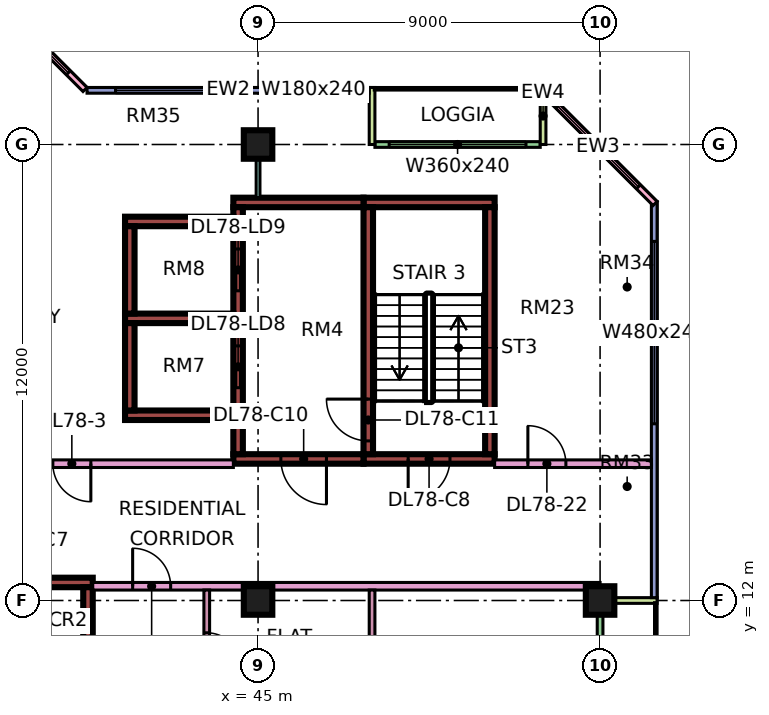
"""IFC4 building model, lengths in metres.
Left out: names, types, materials, properties, quantities, classifications, styles, units other than length and angle.
Written with IfcOpenShell. Run it as: python <this file> out.ifc"""

import sys

from ifc_helpers import new_model, si_unit, direction, frame, frame_2d, origin, origin_2d, place, context, subcontext, project, spatial, rectangle, extrude, element, fill, save


model = new_model("IFC4")
c1 = context("Model", 3, precision=1e-05, world=origin(), true_north=direction((0.0, 1.0)))
c2 = subcontext(c1, "Body", "Model", "MODEL_VIEW")
j1 = project(units=[si_unit("LENGTHUNIT", "METRE"), si_unit("PLANEANGLEUNIT", "RADIAN")], contexts=[c1])
p1 = place(None, origin())
s1 = spatial("IfcSite", under=j1, at=p1, CompositionType="ELEMENT")
p2 = place(p1, origin())
s2 = spatial("IfcBuilding", under=s1, at=p2, CompositionType="ELEMENT")
p3 = place(p2, frame((0.0, 0.0, 338.9)))
s3 = spatial("IfcBuildingStorey", under=s2, at=p3, CompositionType="ELEMENT", Elevation=338.9)
for number, where, z_axis, x_axis in (
    (1, (45.0, 12.0, 0.0), (0.0, 0.0, 1.0), (1.0, 0.0, 0.0)),
    (2, (45.0, 24.0, 0.0), (0.0, 0.0, 1.0), (1.0, 0.0, 0.0)),
    (3, (54.0, 12.0, 0.0), (0.0, 0.0, 1.0), (1.0, 0.0, 0.0)),
):
    element("IfcColumn", number, at=place(p3, frame(where, z_axis=z_axis, x_axis=x_axis)), inside=s3, PredefinedType="COLUMN", context=c2, shape_type="SweptSolid", body=[
        extrude(rectangle(XDim=0.75, YDim=0.75, at=origin_2d()), origin(), (0.0, 0.0, 1.0), 3.75),
    ])
p4 = place(p3, frame((36.375, 12.475, 0.0), z_axis=(0.0, 0.0, 1.0), x_axis=(1.0, 0.0, 0.0)))
e4 = element("IfcWall", 4, at=p4, inside=s3, PredefinedType="SHEAR", context=c2, shape_type="SweptSolid", body=[
    extrude(rectangle(XDim=4.275, YDim=0.25, at=frame_2d((2.137, 0.0))), origin(), (0.0, 0.0, 1.0), 3.75),
])
p5 = place(p4, frame((2.0, 0.0, 0.0)))
e5 = element("IfcOpeningElement", 5, at=p5, cuts=e4, PredefinedType="OPENING", context=c2, shape_type="SweptSolid", body=[
    extrude(rectangle(XDim=1.1, YDim=2.2, at=frame_2d((0.55, 1.1))), frame((0.0, 0.135, 0.0), z_axis=(0.0, -1.0, 0.0), x_axis=(1.0, 0.0, 0.0)), (0.0, 0.0, 1.0), 0.27),
])
p6 = place(p3, frame((40.525, 5.85, 0.0), z_axis=(0.0, 0.0, 1.0), x_axis=(0.0, 1.0, 0.0)))
e6 = element("IfcWall", 6, at=p6, inside=s3, PredefinedType="SHEAR", context=c2, shape_type="SweptSolid", body=[
    extrude(rectangle(XDim=6.5, YDim=0.25, at=frame_2d((3.25, 0.0))), origin(), (0.0, 0.0, 1.0), 3.75),
])
p7 = place(p3, frame((47.775, 15.725, 0.0), z_axis=(0.0, 0.0, 1.0), x_axis=(1.0, 0.0, 0.0)))
e7 = element("IfcWall", 7, at=p7, inside=s3, PredefinedType="SHEAR", context=c2, shape_type="SweptSolid", body=[
    extrude(rectangle(XDim=3.45, YDim=0.25, at=frame_2d((1.725, 0.0))), origin(), (0.0, 0.0, 1.0), 3.75),
])
p8 = place(p7, frame((1.175, 0.0, 0.0)))
e8 = element("IfcOpeningElement", 8, at=p8, cuts=e7, PredefinedType="OPENING", context=c2, shape_type="SweptSolid", body=[
    extrude(rectangle(XDim=1.1, YDim=2.2, at=frame_2d((0.55, 1.1))), frame((0.0, 0.135, 0.0), z_axis=(0.0, -1.0, 0.0), x_axis=(1.0, 0.0, 0.0)), (0.0, 0.0, 1.0), 0.27),
])
p9 = place(p3, frame((47.775, 22.475, 0.0), z_axis=(0.0, 0.0, 1.0), x_axis=(1.0, 0.0, 0.0)))
e9 = element("IfcWall", 9, at=p9, inside=s3, PredefinedType="SHEAR", context=c2, shape_type="SweptSolid", body=[
    extrude(rectangle(XDim=3.45, YDim=0.25, at=frame_2d((1.725, 0.0))), origin(), (0.0, 0.0, 1.0), 3.75),
])
p10 = place(p3, frame((47.9, 15.85, 0.0), z_axis=(0.0, 0.0, 1.0), x_axis=(0.0, 1.0, 0.0)))
e10 = element("IfcWall", 10, at=p10, inside=s3, PredefinedType="SHEAR", context=c2, shape_type="SweptSolid", body=[
    extrude(rectangle(XDim=6.5, YDim=0.25, at=frame_2d((3.25, 0.0))), origin(), (0.0, 0.0, 1.0), 3.75),
])
p11 = place(p10, frame((0.35, 0.0, 0.0)))
e11 = element("IfcOpeningElement", 11, at=p11, cuts=e10, PredefinedType="OPENING", context=c2, shape_type="SweptSolid", body=[
    extrude(rectangle(XDim=1.1, YDim=2.2, at=frame_2d((0.55, 1.1))), frame((0.0, 0.135, 0.0), z_axis=(0.0, -1.0, 0.0), x_axis=(1.0, 0.0, 0.0)), (0.0, 0.0, 1.0), 0.27),
])
p12 = place(p3, frame((51.1, 15.85, 0.0), z_axis=(0.0, 0.0, 1.0), x_axis=(0.0, 1.0, 0.0)))
e12 = element("IfcWall", 12, at=p12, inside=s3, PredefinedType="SHEAR", context=c2, shape_type="SweptSolid", body=[
    extrude(rectangle(XDim=6.5, YDim=0.25, at=frame_2d((3.25, 0.0))), origin(), (0.0, 0.0, 1.0), 3.75),
])
p13 = place(p3, frame((44.35, 15.725, 0.0), z_axis=(0.0, 0.0, 1.0), x_axis=(1.0, 0.0, 0.0)))
e13 = element("IfcWall", 13, at=p13, inside=s3, PredefinedType="SHEAR", context=c2, shape_type="SweptSolid", body=[
    extrude(rectangle(XDim=3.425, YDim=0.25, at=frame_2d((1.712, 0.0))), origin(), (0.0, 0.0, 1.0), 3.75),
])
p14 = place(p13, frame((1.25, 0.0, 0.0)))
e14 = element("IfcOpeningElement", 14, at=p14, cuts=e13, PredefinedType="OPENING", context=c2, shape_type="SweptSolid", body=[
    extrude(rectangle(XDim=1.2, YDim=2.2, at=frame_2d((0.6, 1.1))), frame((0.0, 0.135, 0.0), z_axis=(0.0, -1.0, 0.0), x_axis=(1.0, 0.0, 0.0)), (0.0, 0.0, 1.0), 0.27),
])
p15 = place(p3, frame((44.35, 22.475, 0.0), z_axis=(0.0, 0.0, 1.0), x_axis=(1.0, 0.0, 0.0)))
e15 = element("IfcWall", 15, at=p15, inside=s3, PredefinedType="SHEAR", context=c2, shape_type="SweptSolid", body=[
    extrude(rectangle(XDim=3.425, YDim=0.25, at=frame_2d((1.712, 0.0))), origin(), (0.0, 0.0, 1.0), 3.75),
])
p16 = place(p3, frame((44.475, 15.85, 0.0), z_axis=(0.0, 0.0, 1.0), x_axis=(0.0, 1.0, 0.0)))
e16 = element("IfcWall", 16, at=p16, inside=s3, PredefinedType="SHEAR", context=c2, shape_type="SweptSolid", body=[
    extrude(rectangle(XDim=6.5, YDim=0.25, at=frame_2d((3.25, 0.0))), origin(), (0.0, 0.0, 1.0), 3.75),
])
p17 = place(p16, frame((1.75, 0.0, 0.0)))
e17 = element("IfcOpeningElement", 17, at=p17, cuts=e16, PredefinedType="OPENING", context=c2, shape_type="SweptSolid", body=[
    extrude(rectangle(XDim=1.1, YDim=2.2, at=frame_2d((0.55, 1.1))), frame((0.0, 0.135, 0.0), z_axis=(0.0, -1.0, 0.0), x_axis=(1.0, 0.0, 0.0)), (0.0, 0.0, 1.0), 0.27),
])
p18 = place(p16, frame((4.3, 0.0, 0.0)))
e18 = element("IfcOpeningElement", 18, at=p18, cuts=e16, PredefinedType="OPENING", context=c2, shape_type="SweptSolid", body=[
    extrude(rectangle(XDim=1.1, YDim=2.2, at=frame_2d((0.55, 1.1))), frame((0.0, 0.135, 0.0), z_axis=(0.0, -1.0, 0.0), x_axis=(1.0, 0.0, 0.0)), (0.0, 0.0, 1.0), 0.27),
])
for number, where, z_axis, x_axis in (
    (19, (41.5, 16.875, 0.0), (0.0, 0.0, 1.0), (1.0, 0.0, 0.0)),
    (20, (41.5, 19.425, 0.0), (0.0, 0.0, 1.0), (1.0, 0.0, 0.0)),
    (21, (41.5, 21.975, 0.0), (0.0, 0.0, 1.0), (1.0, 0.0, 0.0)),
):
    element("IfcWall", number, at=place(p3, frame(where, z_axis=z_axis, x_axis=x_axis)), inside=s3, PredefinedType="SHEAR", context=c2, shape_type="SweptSolid", body=[
        extrude(rectangle(XDim=2.85, YDim=0.25, at=frame_2d((1.425, 0.0))), origin(), (0.0, 0.0, 1.0), 3.75),
    ])
for number, where, z_axis, x_axis in (
    (22, (41.625, 17.0, 0.0), (0.0, 0.0, 1.0), (0.0, 1.0, 0.0)),
    (23, (41.625, 19.55, 0.0), (0.0, 0.0, 1.0), (0.0, 1.0, 0.0)),
):
    element("IfcWall", number, at=place(p3, frame(where, z_axis=z_axis, x_axis=x_axis)), inside=s3, PredefinedType="SHEAR", context=c2, shape_type="SweptSolid", body=[
        extrude(rectangle(XDim=2.3, YDim=0.25, at=frame_2d((1.15, 0.0))), origin(), (0.0, 0.0, 1.0), 3.75),
    ])
p19 = place(p3, frame((52.425, 24.0, 0.0), z_axis=(0.0, 0.0, 1.0), x_axis=(-1.0, 0.0, 0.0)))
e24 = element("IfcWall", 24, at=p19, inside=s3, PredefinedType="SOLIDWALL", context=c2, shape_type="SweptSolid", body=[
    extrude(rectangle(XDim=4.35, YDim=0.15, at=frame_2d((2.175, 0.0))), origin(), (0.0, 0.0, 1.0), 3.35),
])
p20 = place(p19, frame((0.375, 0.0, 0.45)))
e25 = element("IfcOpeningElement", 25, at=p20, cuts=e24, PredefinedType="OPENING", context=c2, shape_type="SweptSolid", body=[
    extrude(rectangle(XDim=3.6, YDim=2.4, at=frame_2d((1.8, 1.2))), frame((0.0, 0.085, 0.0), z_axis=(0.0, -1.0, 0.0), x_axis=(1.0, 0.0, 0.0)), (0.0, 0.0, 1.0), 0.17),
])
for number, where, z_axis, x_axis in (
    (26, (52.5, 25.5, 0.0), (0.0, 0.0, 1.0), (0.0, -1.0, 0.0)),
    (27, (48.0, 25.5, 0.0), (0.0, 0.0, 1.0), (0.0, -1.0, 0.0)),
):
    element("IfcWall", number, at=place(p3, frame(where, z_axis=z_axis, x_axis=x_axis)), inside=s3, PredefinedType="SOLIDWALL", context=c2, shape_type="SweptSolid", body=[
        extrude(rectangle(XDim=1.5, YDim=0.15, at=frame_2d((0.75, 0.0))), origin(), (0.0, 0.0, 1.0), 3.35),
    ])
p21 = place(p3, frame((47.925, 25.425, 0.0), z_axis=(0.0, 0.0, 1.0), x_axis=(-1.0, 0.0, 0.0)))
e28 = element("IfcWall", 28, at=p21, inside=s3, PredefinedType="SOLIDWALL", context=c2, shape_type="SweptSolid", body=[
    extrude(rectangle(XDim=7.425, YDim=0.15, at=frame_2d((3.712, 0.0))), origin(), (0.0, 0.0, 1.0), 3.35),
])
p22 = place(p21, frame((0.562, 0.0, 0.45)))
e29 = element("IfcOpeningElement", 29, at=p22, cuts=e28, PredefinedType="OPENING", context=c2, shape_type="SweptSolid", body=[
    extrude(rectangle(XDim=1.8, YDim=2.4, at=frame_2d((0.9, 1.2))), frame((0.0, 0.085, 0.0), z_axis=(0.0, -1.0, 0.0), x_axis=(1.0, 0.0, 0.0)), (0.0, 0.0, 1.0), 0.17),
])
p23 = place(p21, frame((3.675, 0.0, 0.45)))
e30 = element("IfcOpeningElement", 30, at=p23, cuts=e28, PredefinedType="OPENING", context=c2, shape_type="SweptSolid", body=[
    extrude(rectangle(XDim=3.0, YDim=2.4, at=frame_2d((1.5, 1.2))), frame((0.0, 0.085, 0.0), z_axis=(0.0, -1.0, 0.0), x_axis=(1.0, 0.0, 0.0)), (0.0, 0.0, 1.0), 0.17),
])
p24 = place(p3, frame((40.447, 25.447, 0.0), z_axis=(0.0, 0.0, 1.0), x_axis=(-0.707106781187, 0.707106781187, 0.0)))
e31 = element("IfcWall", 31, at=p24, inside=s3, PredefinedType="SOLIDWALL", context=c2, shape_type="SweptSolid", body=[
    extrude(rectangle(XDim=4.243, YDim=0.15, at=frame_2d((2.121, 0.0))), origin(), (0.0, 0.0, 1.0), 3.35),
])
p25 = place(p24, frame((0.621, 0.0, 0.45)))
e32 = element("IfcOpeningElement", 32, at=p25, cuts=e31, PredefinedType="OPENING", context=c2, shape_type="SweptSolid", body=[
    extrude(rectangle(XDim=3.0, YDim=2.4, at=frame_2d((1.5, 1.2))), frame((0.0, 0.085, 0.0), z_axis=(0.0, -1.0, 0.0), x_axis=(1.0, 0.0, 0.0)), (0.0, 0.0, 1.0), 0.17),
])
p26 = place(p3, frame((54.0, 1.575, 0.0), z_axis=(0.0, 0.0, 1.0), x_axis=(0.0, 1.0, 0.0)))
e33 = element("IfcWall", 33, at=p26, inside=s3, PredefinedType="SOLIDWALL", context=c2, shape_type="SweptSolid", body=[
    extrude(rectangle(XDim=10.35, YDim=0.15, at=frame_2d((5.175, 0.0))), origin(), (0.0, 0.0, 1.0), 3.35),
])
p27 = place(p26, frame((0.663, 0.0, 0.0)))
e34 = element("IfcOpeningElement", 34, at=p27, cuts=e33, PredefinedType="OPENING", context=c2, shape_type="SweptSolid", body=[
    extrude(rectangle(XDim=1.8, YDim=2.4, at=frame_2d((0.9, 1.2))), frame((0.0, 0.085, 0.0), z_axis=(0.0, -1.0, 0.0), x_axis=(1.0, 0.0, 0.0)), (0.0, 0.0, 1.0), 0.17),
])
p28 = place(p26, frame((5.637, 0.0, 0.45)))
e35 = element("IfcOpeningElement", 35, at=p28, cuts=e33, PredefinedType="OPENING", context=c2, shape_type="SweptSolid", body=[
    extrude(rectangle(XDim=3.0, YDim=2.4, at=frame_2d((1.5, 1.2))), frame((0.0, 0.085, 0.0), z_axis=(0.0, -1.0, 0.0), x_axis=(1.0, 0.0, 0.0)), (0.0, 0.0, 1.0), 0.17),
])
p29 = place(p3, frame((55.5, 12.0, 0.0), z_axis=(0.0, 0.0, 1.0), x_axis=(-1.0, 0.0, 0.0)))
e36 = element("IfcWall", 36, at=p29, inside=s3, PredefinedType="SOLIDWALL", context=c2, shape_type="SweptSolid", body=[
    extrude(rectangle(XDim=1.5, YDim=0.15, at=frame_2d((0.75, 0.0))), origin(), (0.0, 0.0, 1.0), 3.35),
])
p30 = place(p3, frame((55.425, 12.075, 0.0), z_axis=(0.0, 0.0, 1.0), x_axis=(0.0, 1.0, 0.0)))
e37 = element("IfcWall", 37, at=p30, inside=s3, PredefinedType="SOLIDWALL", context=c2, shape_type="SweptSolid", body=[
    extrude(rectangle(XDim=10.425, YDim=0.15, at=frame_2d((5.212, 0.0))), origin(), (0.0, 0.0, 1.0), 3.35),
])
p31 = place(p30, frame((4.575, 0.0, 0.45)))
e38 = element("IfcOpeningElement", 38, at=p31, cuts=e37, PredefinedType="OPENING", context=c2, shape_type="SweptSolid", body=[
    extrude(rectangle(XDim=4.8, YDim=2.4, at=frame_2d((2.4, 1.2))), frame((0.0, 0.085, 0.0), z_axis=(0.0, -1.0, 0.0), x_axis=(1.0, 0.0, 0.0)), (0.0, 0.0, 1.0), 0.17),
])
p32 = place(p3, frame((55.447, 22.447, 0.0), z_axis=(0.0, 0.0, 1.0), x_axis=(-0.707106781187, 0.707106781187, 0.0)))
e39 = element("IfcWall", 39, at=p32, inside=s3, PredefinedType="SOLIDWALL", context=c2, shape_type="SweptSolid", body=[
    extrude(rectangle(XDim=4.243, YDim=0.15, at=frame_2d((2.121, 0.0))), origin(), (0.0, 0.0, 1.0), 3.35),
])
p33 = place(p32, frame((0.621, 0.0, 0.45)))
e40 = element("IfcOpeningElement", 40, at=p33, cuts=e39, PredefinedType="OPENING", context=c2, shape_type="SweptSolid", body=[
    extrude(rectangle(XDim=3.0, YDim=2.4, at=frame_2d((1.5, 1.2))), frame((0.0, 0.085, 0.0), z_axis=(0.0, -1.0, 0.0), x_axis=(1.0, 0.0, 0.0)), (0.0, 0.0, 1.0), 0.17),
])
p34 = place(p3, frame((34.0, 15.6, 0.0), z_axis=(0.0, 0.0, 1.0), x_axis=(1.0, 0.0, 0.0)))
e41 = element("IfcWall", 41, at=p34, inside=s3, PredefinedType="PARTITIONING", context=c2, shape_type="SweptSolid", body=[
    extrude(rectangle(XDim=10.35, YDim=0.2, at=frame_2d((5.175, 0.0))), origin(), (0.0, 0.0, 1.0), 3.35),
])
p35 = place(p34, frame((5.6, 0.0, 0.0)))
e42 = element("IfcOpeningElement", 42, at=p35, cuts=e41, PredefinedType="OPENING", context=c2, shape_type="SweptSolid", body=[
    extrude(rectangle(XDim=1.0, YDim=2.1, at=frame_2d((0.5, 1.05))), frame((0.0, 0.11, 0.0), z_axis=(0.0, -1.0, 0.0), x_axis=(1.0, 0.0, 0.0)), (0.0, 0.0, 1.0), 0.22),
])
p36 = place(p34, frame((0.45, 0.0, 0.0)))
e43 = element("IfcOpeningElement", 43, at=p36, cuts=e41, PredefinedType="OPENING", context=c2, shape_type="SweptSolid", body=[
    extrude(rectangle(XDim=1.2, YDim=2.1, at=frame_2d((0.6, 1.05))), frame((0.0, 0.11, 0.0), z_axis=(0.0, -1.0, 0.0), x_axis=(1.0, 0.0, 0.0)), (0.0, 0.0, 1.0), 0.22),
])
p37 = place(p3, frame((40.65, 12.375, 0.0), z_axis=(0.0, 0.0, 1.0), x_axis=(1.0, 0.0, 0.0)))
e44 = element("IfcWall", 44, at=p37, inside=s3, PredefinedType="PARTITIONING", context=c2, shape_type="SweptSolid", body=[
    extrude(rectangle(XDim=13.35, YDim=0.2, at=frame_2d((6.675, 0.0))), origin(), (0.0, 0.0, 1.0), 3.35),
])
p38 = place(p37, frame((1.05, 0.0, 0.0)))
e45 = element("IfcOpeningElement", 45, at=p38, cuts=e44, PredefinedType="OPENING", context=c2, shape_type="SweptSolid", body=[
    extrude(rectangle(XDim=1.0, YDim=2.1, at=frame_2d((0.5, 1.05))), frame((0.0, 0.11, 0.0), z_axis=(0.0, -1.0, 0.0), x_axis=(1.0, 0.0, 0.0)), (0.0, 0.0, 1.0), 0.22),
])
p39 = place(p3, frame((43.65, 5.975, 0.0), z_axis=(0.0, 0.0, 1.0), x_axis=(0.0, 1.0, 0.0)))
e46 = element("IfcWall", 46, at=p39, inside=s3, PredefinedType="PARTITIONING", context=c2, shape_type="SweptSolid", body=[
    extrude(rectangle(XDim=6.3, YDim=0.15, at=frame_2d((3.15, 0.0))), origin(), (0.0, 0.0, 1.0), 3.35),
])
p40 = place(p39, frame((4.275, 0.0, 0.0)))
e47 = element("IfcOpeningElement", 47, at=p40, cuts=e46, PredefinedType="OPENING", context=c2, shape_type="SweptSolid", body=[
    extrude(rectangle(XDim=0.9, YDim=2.1, at=frame_2d((0.45, 1.05))), frame((0.0, 0.085, 0.0), z_axis=(0.0, -1.0, 0.0), x_axis=(1.0, 0.0, 0.0)), (0.0, 0.0, 1.0), 0.17),
])
p41 = place(p3, frame((45.0, 22.6, 0.0), z_axis=(0.0, 0.0, 1.0), x_axis=(0.0, 1.0, 0.0)))
e48 = element("IfcWall", 48, at=p41, inside=s3, PredefinedType="PARTITIONING", context=c2, shape_type="SweptSolid", body=[
    extrude(rectangle(XDim=1.4, YDim=0.1, at=frame_2d((0.7, 0.0))), origin(), (0.0, 0.0, 1.0), 3.35),
])
p42 = place(p3, frame((48.0, 5.975, 0.0), z_axis=(0.0, 0.0, 1.0), x_axis=(0.0, 1.0, 0.0)))
e49 = element("IfcWall", 49, at=p42, inside=s3, PredefinedType="PARTITIONING", context=c2, shape_type="SweptSolid", body=[
    extrude(rectangle(XDim=6.3, YDim=0.15, at=frame_2d((3.15, 0.0))), origin(), (0.0, 0.0, 1.0), 3.35),
])
p43 = place(p3, frame((51.225, 15.6, 0.0), z_axis=(0.0, 0.0, 1.0), x_axis=(1.0, 0.0, 0.0)))
e50 = element("IfcWall", 50, at=p43, inside=s3, PredefinedType="PARTITIONING", context=c2, shape_type="SweptSolid", body=[
    extrude(rectangle(XDim=4.125, YDim=0.2, at=frame_2d((2.062, 0.0))), origin(), (0.0, 0.0, 1.0), 3.35),
])
p44 = place(p43, frame((0.875, 0.0, 0.0)))
e51 = element("IfcOpeningElement", 51, at=p44, cuts=e50, PredefinedType="OPENING", context=c2, shape_type="SweptSolid", body=[
    extrude(rectangle(XDim=1.0, YDim=2.1, at=frame_2d((0.5, 1.05))), frame((0.0, 0.11, 0.0), z_axis=(0.0, -1.0, 0.0), x_axis=(1.0, 0.0, 0.0)), (0.0, 0.0, 1.0), 0.22),
])
p45 = place(p20, origin())
e52 = element("IfcWindow", 52, at=p45, inside=s3, PartitioningType="SINGLE_PANEL", PredefinedType="WINDOW", context=c2, shape_type="SweptSolid", body=[
    extrude(rectangle(XDim=3.6, YDim=2.4, at=frame_2d((1.8, 1.2))), frame((0.0, 0.03, 0.0), z_axis=(0.0, -1.0, 0.0), x_axis=(1.0, 0.0, 0.0)), (0.0, 0.0, 1.0), 0.06),
])
fill(e25, e52)
p46 = place(p22, origin())
e53 = element("IfcWindow", 53, at=p46, inside=s3, PartitioningType="SINGLE_PANEL", PredefinedType="WINDOW", context=c2, shape_type="SweptSolid", body=[
    extrude(rectangle(XDim=1.8, YDim=2.4, at=frame_2d((0.9, 1.2))), frame((0.0, 0.03, 0.0), z_axis=(0.0, -1.0, 0.0), x_axis=(1.0, 0.0, 0.0)), (0.0, 0.0, 1.0), 0.06),
])
fill(e29, e53)
p47 = place(p23, origin())
e54 = element("IfcWindow", 54, at=p47, inside=s3, PartitioningType="SINGLE_PANEL", PredefinedType="WINDOW", context=c2, shape_type="SweptSolid", body=[
    extrude(rectangle(XDim=3.0, YDim=2.4, at=frame_2d((1.5, 1.2))), frame((0.0, 0.03, 0.0), z_axis=(0.0, -1.0, 0.0), x_axis=(1.0, 0.0, 0.0)), (0.0, 0.0, 1.0), 0.06),
])
fill(e30, e54)
p48 = place(p25, origin())
e55 = element("IfcWindow", 55, at=p48, inside=s3, PartitioningType="SINGLE_PANEL", PredefinedType="WINDOW", context=c2, shape_type="SweptSolid", body=[
    extrude(rectangle(XDim=3.0, YDim=2.4, at=frame_2d((1.5, 1.2))), frame((0.0, 0.03, 0.0), z_axis=(0.0, -1.0, 0.0), x_axis=(1.0, 0.0, 0.0)), (0.0, 0.0, 1.0), 0.06),
])
fill(e32, e55)
p49 = place(p31, origin())
e56 = element("IfcWindow", 56, at=p49, inside=s3, PartitioningType="SINGLE_PANEL", PredefinedType="WINDOW", context=c2, shape_type="SweptSolid", body=[
    extrude(rectangle(XDim=4.8, YDim=2.4, at=frame_2d((2.4, 1.2))), frame((0.0, 0.03, 0.0), z_axis=(0.0, -1.0, 0.0), x_axis=(1.0, 0.0, 0.0)), (0.0, 0.0, 1.0), 0.06),
])
fill(e38, e56)
p50 = place(p33, origin())
e57 = element("IfcWindow", 57, at=p50, inside=s3, PartitioningType="SINGLE_PANEL", PredefinedType="WINDOW", context=c2, shape_type="SweptSolid", body=[
    extrude(rectangle(XDim=3.0, YDim=2.4, at=frame_2d((1.5, 1.2))), frame((0.0, 0.03, 0.0), z_axis=(0.0, -1.0, 0.0), x_axis=(1.0, 0.0, 0.0)), (0.0, 0.0, 1.0), 0.06),
])
fill(e40, e57)
p51 = place(p8, frame((1.1, 0.0, 0.0), z_axis=(0.0, 0.0, 1.0), x_axis=(-1.0, 0.0, 0.0)))
e58 = element("IfcDoor", 58, at=p51, inside=s3, OperationType="SINGLE_SWING_LEFT", PredefinedType="DOOR", context=c2, shape_type="SweptSolid", body=[
    extrude(rectangle(XDim=1.1, YDim=2.2, at=frame_2d((0.55, 1.1))), frame((0.0, 0.025, 0.0), z_axis=(0.0, -1.0, 0.0), x_axis=(1.0, 0.0, 0.0)), (0.0, 0.0, 1.0), 0.05),
])
fill(e8, e58)
p52 = place(p14, origin())
e59 = element("IfcDoor", 59, at=p52, inside=s3, OperationType="SINGLE_SWING_RIGHT", PredefinedType="DOOR", context=c2, shape_type="SweptSolid", body=[
    extrude(rectangle(XDim=1.2, YDim=2.2, at=frame_2d((0.6, 1.1))), frame((0.0, 0.025, 0.0), z_axis=(0.0, -1.0, 0.0), x_axis=(1.0, 0.0, 0.0)), (0.0, 0.0, 1.0), 0.05),
])
fill(e14, e59)
p53 = place(p11, frame((1.1, 0.0, 0.0), z_axis=(0.0, 0.0, 1.0), x_axis=(-1.0, 0.0, 0.0)))
e60 = element("IfcDoor", 60, at=p53, inside=s3, OperationType="SINGLE_SWING_RIGHT", PredefinedType="DOOR", context=c2, shape_type="SweptSolid", body=[
    extrude(rectangle(XDim=1.1, YDim=2.2, at=frame_2d((0.55, 1.1))), frame((0.0, 0.025, 0.0), z_axis=(0.0, -1.0, 0.0), x_axis=(1.0, 0.0, 0.0)), (0.0, 0.0, 1.0), 0.05),
])
fill(e11, e60)
p54 = place(p17, origin())
e61 = element("IfcDoor", 61, at=p54, inside=s3, OperationType="DOUBLE_DOOR_SLIDING", PredefinedType="DOOR", context=c2, shape_type="SweptSolid", body=[
    extrude(rectangle(XDim=1.1, YDim=2.2, at=frame_2d((0.55, 1.1))), frame((0.0, 0.025, 0.0), z_axis=(0.0, -1.0, 0.0), x_axis=(1.0, 0.0, 0.0)), (0.0, 0.0, 1.0), 0.05),
])
fill(e17, e61)
p55 = place(p18, origin())
e62 = element("IfcDoor", 62, at=p55, inside=s3, OperationType="DOUBLE_DOOR_SLIDING", PredefinedType="DOOR", context=c2, shape_type="SweptSolid", body=[
    extrude(rectangle(XDim=1.1, YDim=2.2, at=frame_2d((0.55, 1.1))), frame((0.0, 0.025, 0.0), z_axis=(0.0, -1.0, 0.0), x_axis=(1.0, 0.0, 0.0)), (0.0, 0.0, 1.0), 0.05),
])
fill(e18, e62)
p56 = place(p35, origin())
e63 = element("IfcDoor", 63, at=p56, inside=s3, OperationType="SINGLE_SWING_RIGHT", PredefinedType="DOOR", context=c2, shape_type="SweptSolid", body=[
    extrude(rectangle(XDim=1.0, YDim=2.1, at=frame_2d((0.5, 1.05))), frame((0.0, 0.025, 0.0), z_axis=(0.0, -1.0, 0.0), x_axis=(1.0, 0.0, 0.0)), (0.0, 0.0, 1.0), 0.05),
])
fill(e42, e63)
p57 = place(p44, origin())
e64 = element("IfcDoor", 64, at=p57, inside=s3, OperationType="SINGLE_SWING_LEFT", PredefinedType="DOOR", context=c2, shape_type="SweptSolid", body=[
    extrude(rectangle(XDim=1.0, YDim=2.1, at=frame_2d((0.5, 1.05))), frame((0.0, 0.025, 0.0), z_axis=(0.0, -1.0, 0.0), x_axis=(1.0, 0.0, 0.0)), (0.0, 0.0, 1.0), 0.05),
])
fill(e51, e64)
p58 = place(p38, origin())
e65 = element("IfcDoor", 65, at=p58, inside=s3, OperationType="SINGLE_SWING_LEFT", PredefinedType="DOOR", context=c2, shape_type="SweptSolid", body=[
    extrude(rectangle(XDim=1.0, YDim=2.1, at=frame_2d((0.5, 1.05))), frame((0.0, 0.025, 0.0), z_axis=(0.0, -1.0, 0.0), x_axis=(1.0, 0.0, 0.0)), (0.0, 0.0, 1.0), 0.05),
])
fill(e45, e65)
p59 = place(p40, frame((0.9, 0.0, 0.0), z_axis=(0.0, 0.0, 1.0), x_axis=(-1.0, 0.0, 0.0)))
e66 = element("IfcDoor", 66, at=p59, inside=s3, OperationType="SINGLE_SWING_LEFT", PredefinedType="DOOR", context=c2, shape_type="SweptSolid", body=[
    extrude(rectangle(XDim=0.9, YDim=2.1, at=frame_2d((0.45, 1.05))), frame((0.0, 0.025, 0.0), z_axis=(0.0, -1.0, 0.0), x_axis=(1.0, 0.0, 0.0)), (0.0, 0.0, 1.0), 0.05),
])
fill(e47, e66)
save(model, sys.argv[1])
